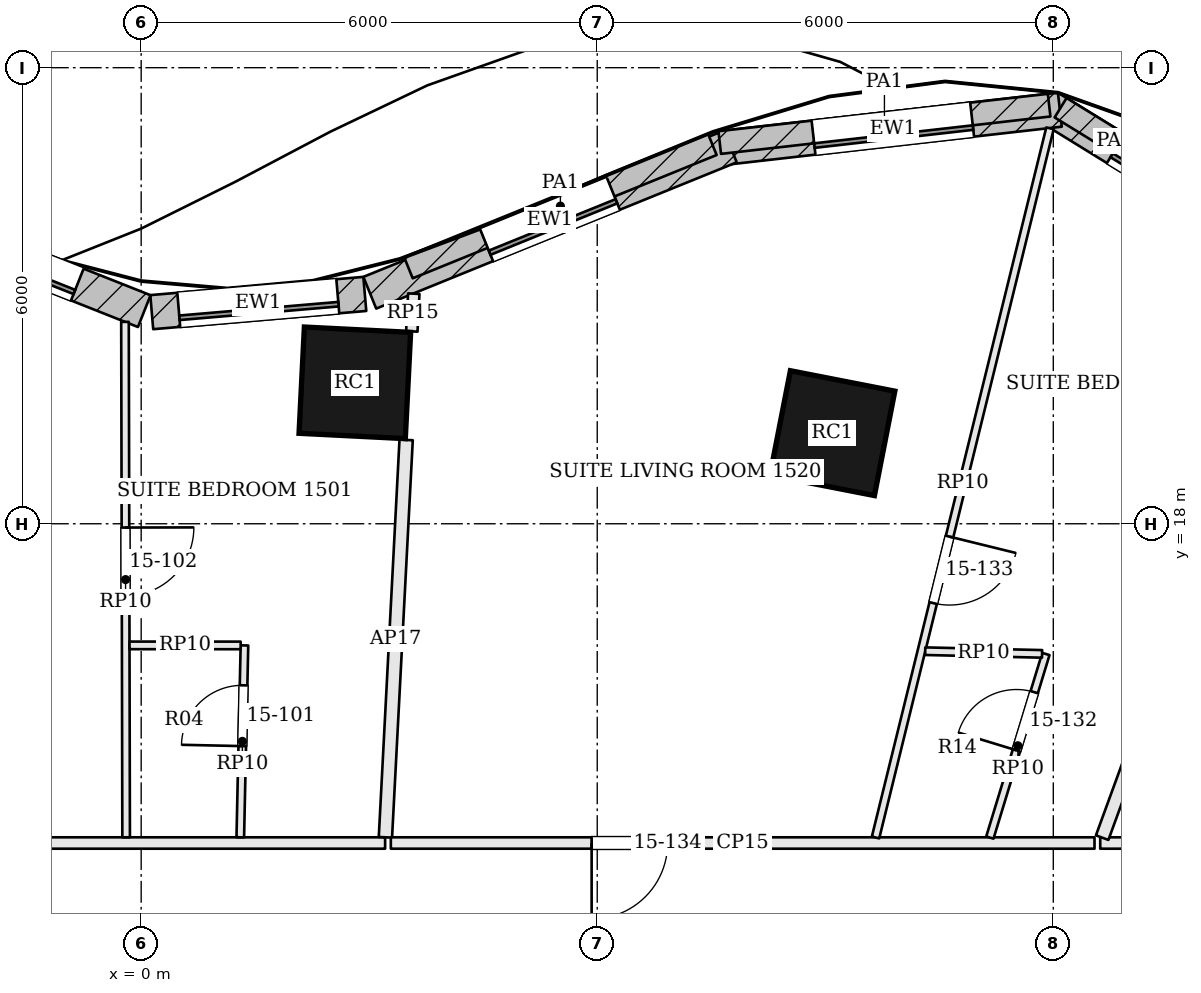
"""IFC4 building model, lengths in metres.
Left out: names, types, materials, properties, quantities, classifications, styles, units other than length and angle.
Written with IfcOpenShell. Run it as: python <this file> out.ifc"""

import sys

from ifc_helpers import new_model, si_unit, direction, frame, frame_2d, origin, origin_2d, place, context, subcontext, project, spatial, rectangle, extrude, element, fill, save


model = new_model("IFC4")
c1 = context("Model", 3, precision=1e-05, world=origin(), true_north=direction((0.0, 1.0)))
c2 = subcontext(c1, "Body", "Model", "MODEL_VIEW")
j1 = project(units=[si_unit("LENGTHUNIT", "METRE"), si_unit("PLANEANGLEUNIT", "RADIAN")], contexts=[c1])
p1 = place(None, origin())
s1 = spatial("IfcSite", under=j1, at=p1, CompositionType="ELEMENT")
p2 = place(p1, origin())
s2 = spatial("IfcBuilding", under=s1, at=p2, CompositionType="ELEMENT")
p3 = place(p2, frame((0.0, 0.0, 69.9)))
s3 = spatial("IfcBuildingStorey", under=s2, at=p3, CompositionType="ELEMENT", Elevation=69.9)
for number, where, z_axis, x_axis in (
    (1, (9.094, 19.192, 0.0), (0.0, 0.0, 1.0), (-0.981, 0.192, 0.0)),
    (2, (2.811, 19.854, 0.0), (0.0, 0.0, 1.0), (-0.999, 0.05, 0.0)),
):
    element("IfcColumn", number, at=place(p3, frame(where, z_axis=z_axis, x_axis=x_axis)), inside=s3, PredefinedType="COLUMN", context=c2, shape_type="SweptSolid", body=[
        extrude(rectangle(XDim=1.4, YDim=1.4, at=origin_2d()), origin(), (0.0, 0.0, 1.0), 3.6),
    ])
p4 = place(p3, frame((15.492, 21.293, 0.0), z_axis=(0.0, 0.0, 1.0), x_axis=(-0.851428967753, 0.524469935145, 0.0)))
e3 = element("IfcWall", 3, at=p4, inside=s3, PredefinedType="SOLIDWALL", context=c2, shape_type="SweptSolid", body=[
    extrude(rectangle(XDim=4.168, YDim=0.45, at=frame_2d((2.084, 0.0))), origin(), (0.0, 0.0, 1.0), 3.4),
])
p5 = place(p4, frame((1.034, 0.0, 0.9)))
e4 = element("IfcOpeningElement", 4, at=p5, cuts=e3, PredefinedType="OPENING", context=c2, shape_type="SweptSolid", body=[
    extrude(rectangle(XDim=2.1, YDim=2.0, at=frame_2d((1.05, 1.0))), frame((0.0, 0.235, 0.0), z_axis=(0.0, -1.0, 0.0), x_axis=(1.0, 0.0, 0.0)), (0.0, 0.0, 1.0), 0.47),
])
p6 = place(p3, frame((12.086, 23.448, 0.0), z_axis=(0.0, 0.0, 1.0), x_axis=(-0.993615664665, -0.112818043472, 0.0)))
e5 = element("IfcWall", 5, at=p6, inside=s3, PredefinedType="SOLIDWALL", context=c2, shape_type="SweptSolid", body=[
    extrude(rectangle(XDim=4.423, YDim=0.45, at=frame_2d((2.212, 0.0))), origin(), (0.0, 0.0, 1.0), 3.4),
])
p7 = place(p6, frame((1.162, 0.0, 0.9)))
e6 = element("IfcOpeningElement", 6, at=p7, cuts=e5, PredefinedType="OPENING", context=c2, shape_type="SweptSolid", body=[
    extrude(rectangle(XDim=2.1, YDim=2.0, at=frame_2d((1.05, 1.0))), frame((0.0, 0.235, 0.0), z_axis=(0.0, -1.0, 0.0), x_axis=(1.0, 0.0, 0.0)), (0.0, 0.0, 1.0), 0.47),
])
p8 = place(p3, frame((7.75, 22.964, 0.0), z_axis=(0.0, 0.0, 1.0), x_axis=(-0.926629703254, -0.375975255897, 0.0)))
e7 = element("IfcWall", 7, at=p8, inside=s3, PredefinedType="SOLIDWALL", context=c2, shape_type="SweptSolid", body=[
    extrude(rectangle(XDim=5.118, YDim=0.45, at=frame_2d((2.559, 0.0))), origin(), (0.0, 0.0, 1.0), 3.4),
])
p9 = place(p8, frame((1.659, 0.0, 0.9)))
e8 = element("IfcOpeningElement", 8, at=p9, cuts=e7, PredefinedType="OPENING", context=c2, shape_type="SweptSolid", body=[
    extrude(rectangle(XDim=1.8, YDim=2.0, at=frame_2d((0.9, 1.0))), frame((0.0, 0.235, 0.0), z_axis=(0.0, -1.0, 0.0), x_axis=(1.0, 0.0, 0.0)), (0.0, 0.0, 1.0), 0.47),
])
p10 = place(p3, frame((2.942, 21.024, 0.0), z_axis=(0.0, 0.0, 1.0), x_axis=(-0.996362034459, -0.085221454389, 0.0)))
e9 = element("IfcWall", 9, at=p10, inside=s3, PredefinedType="SOLIDWALL", context=c2, shape_type="SweptSolid", body=[
    extrude(rectangle(XDim=2.813, YDim=0.45, at=frame_2d((1.407, 0.0))), origin(), (0.0, 0.0, 1.0), 3.4),
])
p11 = place(p10, frame((0.357, 0.0, 0.9)))
e10 = element("IfcOpeningElement", 10, at=p11, cuts=e9, PredefinedType="OPENING", context=c2, shape_type="SweptSolid", body=[
    extrude(rectangle(XDim=2.1, YDim=2.0, at=frame_2d((1.05, 1.0))), frame((0.0, 0.235, 0.0), z_axis=(0.0, -1.0, 0.0), x_axis=(1.0, 0.0, 0.0)), (0.0, 0.0, 1.0), 0.47),
])
p12 = place(p3, frame((0.041, 20.798, 0.0), z_axis=(0.0, 0.0, 1.0), x_axis=(-0.929539262027, 0.368723148649, 0.0)))
e11 = element("IfcWall", 11, at=p12, inside=s3, PredefinedType="SOLIDWALL", context=c2, shape_type="SweptSolid", body=[
    extrude(rectangle(XDim=3.995, YDim=0.45, at=frame_2d((1.997, 0.0))), origin(), (0.0, 0.0, 1.0), 3.4),
])
p13 = place(p12, frame((0.947, 0.0, 0.9)))
e12 = element("IfcOpeningElement", 12, at=p13, cuts=e11, PredefinedType="OPENING", context=c2, shape_type="SweptSolid", body=[
    extrude(rectangle(XDim=2.1, YDim=2.0, at=frame_2d((1.05, 1.0))), frame((0.0, 0.235, 0.0), z_axis=(0.0, -1.0, 0.0), x_axis=(1.0, 0.0, 0.0)), (0.0, 0.0, 1.0), 0.47),
])
p14 = place(p3, frame((13.53, 22.59, 3.6), z_axis=(0.0, 0.0, 1.0), x_axis=(-0.851434206084, 0.524461431098, 0.0)))
e13 = element("IfcWall", 13, at=p14, inside=s3, PredefinedType="PARAPET", context=c2, shape_type="SweptSolid", body=[
    extrude(rectangle(XDim=1.684, YDim=0.3, at=frame_2d((0.842, 0.0))), origin(), (0.0, 0.0, 1.0), 1.1),
])
p15 = place(p3, frame((11.945, 23.507, 3.6), z_axis=(0.0, 0.0, 1.0), x_axis=(-0.993618806168, -0.11279037206, 0.0)))
e14 = element("IfcWall", 14, at=p15, inside=s3, PredefinedType="PARAPET", context=c2, shape_type="SweptSolid", body=[
    extrude(rectangle(XDim=4.362, YDim=0.3, at=frame_2d((2.181, 0.0))), origin(), (0.0, 0.0, 1.0), 1.1),
])
p16 = place(p3, frame((7.514, 22.99, 3.6), z_axis=(0.0, 0.0, 1.0), x_axis=(-0.926627413994, -0.375980897966, 0.0)))
e15 = element("IfcWall", 15, at=p16, inside=s3, PredefinedType="PARAPET", context=c2, shape_type="SweptSolid", body=[
    extrude(rectangle(XDim=4.315, YDim=0.3, at=frame_2d((2.157, 0.0))), origin(), (0.0, 0.0, 1.0), 1.1),
])
p17 = place(p3, frame((3.209, 13.8, 0.0), z_axis=(0.0, 0.0, 1.0), x_axis=(-1.0, 0.0, 0.0)))
e16 = element("IfcWall", 16, at=p17, inside=s3, PredefinedType="PARTITIONING", context=c2, shape_type="SweptSolid", body=[
    extrude(rectangle(XDim=12.728, YDim=0.15, at=frame_2d((6.364, 0.0))), origin(), (0.0, 0.0, 1.0), 2.68),
])
p18 = place(p17, frame((7.568, 0.0, 0.0)))
e17 = element("IfcOpeningElement", 17, at=p18, cuts=e16, PredefinedType="OPENING", context=c2, shape_type="SweptSolid", body=[
    extrude(rectangle(XDim=1.0, YDim=2.1, at=frame_2d((0.5, 1.05))), frame((0.0, 0.085, 0.0), z_axis=(0.0, -1.0, 0.0), x_axis=(1.0, 0.0, 0.0)), (0.0, 0.0, 1.0), 0.17),
])
p19 = place(p3, frame((3.586, 21.027, 0.0), z_axis=(0.0, 0.0, 1.0), x_axis=(-0.052094522049, -0.99864215852, 0.0)))
e18 = element("IfcWall", 18, at=p19, inside=s3, PredefinedType="PARTITIONING", context=c2, shape_type="SweptSolid", body=[
    extrude(rectangle(XDim=0.497, YDim=0.15, at=frame_2d((0.249, 0.0))), origin(), (0.0, 0.0, 1.0), 3.4),
])
p20 = place(p3, frame((3.486, 19.103, 0.0), z_axis=(0.0, 0.0, 1.0), x_axis=(-0.052091317725, -0.998642325669, 0.0)))
e19 = element("IfcWall", 19, at=p20, inside=s3, PredefinedType="PARTITIONING", context=c2, shape_type="SweptSolid", body=[
    extrude(rectangle(XDim=5.235, YDim=0.175, at=frame_2d((2.618, 0.0))), origin(), (0.0, 0.0, 1.0), 2.68),
])
p21 = place(p3, frame((14.725, 13.8, 0.0), z_axis=(0.0, 0.0, 1.0), x_axis=(-1.0, 0.0, 0.0)))
e20 = element("IfcWall", 20, at=p21, inside=s3, PredefinedType="PARTITIONING", context=c2, shape_type="SweptSolid", body=[
    extrude(rectangle(XDim=2.108, YDim=0.15, at=frame_2d((1.054, 0.0))), origin(), (0.0, 0.0, 1.0), 2.68),
])
p22 = place(p21, frame((0.45, 0.0, 0.0)))
e21 = element("IfcOpeningElement", 21, at=p22, cuts=e20, PredefinedType="OPENING", context=c2, shape_type="SweptSolid", body=[
    extrude(rectangle(XDim=1.0, YDim=2.1, at=frame_2d((0.5, 1.05))), frame((0.0, 0.085, 0.0), z_axis=(0.0, -1.0, 0.0), x_axis=(1.0, 0.0, 0.0)), (0.0, 0.0, 1.0), 0.17),
])
p23 = place(p3, frame((15.299, 21.143, 0.0), z_axis=(0.0, 0.0, 1.0), x_axis=(-0.343006226001, -0.939333129898, 0.0)))
e22 = element("IfcWall", 22, at=p23, inside=s3, PredefinedType="PARTITIONING", context=c2, shape_type="SweptSolid", body=[
    extrude(rectangle(XDim=7.742, YDim=0.175, at=frame_2d((3.871, 0.0))), origin(), (0.0, 0.0, 1.0), 2.68),
])
p24 = place(p3, frame((12.542, 13.8, 0.0), z_axis=(0.0, 0.0, 1.0), x_axis=(-1.0, 0.0, 0.0)))
e23 = element("IfcWall", 23, at=p24, inside=s3, PredefinedType="PARTITIONING", context=c2, shape_type="SweptSolid", body=[
    extrude(rectangle(XDim=9.258, YDim=0.15, at=frame_2d((4.629, 0.0))), origin(), (0.0, 0.0, 1.0), 2.68),
])
p25 = place(p24, frame((5.616, 0.0, 0.0)))
e24 = element("IfcOpeningElement", 24, at=p25, cuts=e23, PredefinedType="OPENING", context=c2, shape_type="SweptSolid", body=[
    extrude(rectangle(XDim=1.0, YDim=2.1, at=frame_2d((0.5, 1.05))), frame((0.0, 0.085, 0.0), z_axis=(0.0, -1.0, 0.0), x_axis=(1.0, 0.0, 0.0)), (0.0, 0.0, 1.0), 0.17),
])
p26 = place(p3, frame((-0.213, 20.656, 0.0), z_axis=(0.0, 0.0, 1.0), x_axis=(0.002196214325, -0.999997588318, 0.0)))
e25 = element("IfcWall", 25, at=p26, inside=s3, PredefinedType="PARTITIONING", context=c2, shape_type="SweptSolid", body=[
    extrude(rectangle(XDim=6.781, YDim=0.1, at=frame_2d((3.391, 0.0))), origin(), (0.0, 0.0, 1.0), 2.898),
])
p27 = place(p26, frame((2.706, 0.0, 0.0)))
e26 = element("IfcOpeningElement", 26, at=p27, cuts=e25, PredefinedType="OPENING", context=c2, shape_type="SweptSolid", body=[
    extrude(rectangle(XDim=0.9, YDim=2.4, at=frame_2d((0.45, 1.2))), frame((0.0, 0.06, 0.0), z_axis=(0.0, -1.0, 0.0), x_axis=(1.0, 0.0, 0.0)), (0.0, 0.0, 1.0), 0.12),
])
p28 = place(p3, frame((1.304, 13.875, 0.0), z_axis=(0.0, 0.0, 1.0), x_axis=(0.02165836135, 0.99976543018, 0.0)))
e27 = element("IfcWall", 27, at=p28, inside=s3, PredefinedType="PARTITIONING", context=c2, shape_type="SweptSolid", body=[
    extrude(rectangle(XDim=2.525, YDim=0.1, at=frame_2d((1.262, 0.0))), origin(), (0.0, 0.0, 1.0), 2.898),
])
p29 = place(p28, frame((1.2, 0.0, 0.0)))
e28 = element("IfcOpeningElement", 28, at=p29, cuts=e27, PredefinedType="OPENING", context=c2, shape_type="SweptSolid", body=[
    extrude(rectangle(XDim=0.8, YDim=2.1, at=frame_2d((0.4, 1.05))), frame((0.0, 0.06, 0.0), z_axis=(0.0, -1.0, 0.0), x_axis=(1.0, 0.0, 0.0)), (0.0, 0.0, 1.0), 0.12),
])
p30 = place(p3, frame((1.309, 16.399, 0.0), z_axis=(0.0, 0.0, 1.0), x_axis=(-0.99999994424, 0.000333945548, 0.0)))
e29 = element("IfcWall", 29, at=p30, inside=s3, PredefinedType="PARTITIONING", context=c2, shape_type="SweptSolid", body=[
    extrude(rectangle(XDim=1.462, YDim=0.1, at=frame_2d((0.731, 0.0))), origin(), (0.0, 0.0, 1.0), 2.898),
])
p31 = place(p3, frame((11.956, 23.202, 0.0), z_axis=(0.0, 0.0, 1.0), x_axis=(-0.238844688636, -0.971057781345, 0.0)))
e30 = element("IfcWall", 30, at=p31, inside=s3, PredefinedType="PARTITIONING", context=c2, shape_type="SweptSolid", body=[
    extrude(rectangle(XDim=9.607, YDim=0.1, at=frame_2d((4.804, 0.0))), origin(), (0.0, 0.0, 1.0), 2.898),
])
p32 = place(p31, frame((5.532, 0.0, 0.0)))
e31 = element("IfcOpeningElement", 31, at=p32, cuts=e30, PredefinedType="OPENING", context=c2, shape_type="SweptSolid", body=[
    extrude(rectangle(XDim=0.9, YDim=2.4, at=frame_2d((0.45, 1.2))), frame((0.0, 0.06, 0.0), z_axis=(0.0, -1.0, 0.0), x_axis=(1.0, 0.0, 0.0)), (0.0, 0.0, 1.0), 0.12),
])
p33 = place(p3, frame((11.166, 13.872, 0.0), z_axis=(0.0, 0.0, 1.0), x_axis=(0.291788653179, 0.95648281839, 0.0)))
e32 = element("IfcWall", 32, at=p33, inside=s3, PredefinedType="PARTITIONING", context=c2, shape_type="SweptSolid", body=[
    extrude(rectangle(XDim=2.525, YDim=0.1, at=frame_2d((1.263, 0.0))), origin(), (0.0, 0.0, 1.0), 2.898),
])
p34 = place(p33, frame((1.2, 0.0, 0.0)))
e33 = element("IfcOpeningElement", 33, at=p34, cuts=e32, PredefinedType="OPENING", context=c2, shape_type="SweptSolid", body=[
    extrude(rectangle(XDim=0.8, YDim=2.1, at=frame_2d((0.4, 1.05))), frame((0.0, 0.06, 0.0), z_axis=(0.0, -1.0, 0.0), x_axis=(1.0, 0.0, 0.0)), (0.0, 0.0, 1.0), 0.12),
])
p35 = place(p3, frame((11.852, 16.288, 0.0), z_axis=(0.0, 0.0, 1.0), x_axis=(-0.999735071864, 0.023017082474, 0.0)))
e34 = element("IfcWall", 34, at=p35, inside=s3, PredefinedType="PARTITIONING", context=c2, shape_type="SweptSolid", body=[
    extrude(rectangle(XDim=1.538, YDim=0.1, at=frame_2d((0.769, 0.0))), origin(), (0.0, 0.0, 1.0), 2.898),
])
p36 = place(p5, origin())
e35 = element("IfcWindow", 35, at=p36, inside=s3, PartitioningType="SINGLE_PANEL", PredefinedType="WINDOW", context=c2, shape_type="SweptSolid", body=[
    extrude(rectangle(XDim=2.1, YDim=2.0, at=frame_2d((1.05, 1.0))), frame((0.0, 0.135, 0.0), z_axis=(0.0, -1.0, 0.0), x_axis=(1.0, 0.0, 0.0)), (0.0, 0.0, 1.0), 0.06),
])
fill(e4, e35)
p37 = place(p7, origin())
e36 = element("IfcWindow", 36, at=p37, inside=s3, PartitioningType="SINGLE_PANEL", PredefinedType="WINDOW", context=c2, shape_type="SweptSolid", body=[
    extrude(rectangle(XDim=2.1, YDim=2.0, at=frame_2d((1.05, 1.0))), frame((0.0, 0.135, 0.0), z_axis=(0.0, -1.0, 0.0), x_axis=(1.0, 0.0, 0.0)), (0.0, 0.0, 1.0), 0.06),
])
fill(e6, e36)
p38 = place(p9, origin())
e37 = element("IfcWindow", 37, at=p38, inside=s3, PartitioningType="SINGLE_PANEL", PredefinedType="WINDOW", context=c2, shape_type="SweptSolid", body=[
    extrude(rectangle(XDim=1.8, YDim=2.0, at=frame_2d((0.9, 1.0))), frame((0.0, 0.135, 0.0), z_axis=(0.0, -1.0, 0.0), x_axis=(1.0, 0.0, 0.0)), (0.0, 0.0, 1.0), 0.06),
])
fill(e8, e37)
p39 = place(p11, origin())
e38 = element("IfcWindow", 38, at=p39, inside=s3, PartitioningType="SINGLE_PANEL", PredefinedType="WINDOW", context=c2, shape_type="SweptSolid", body=[
    extrude(rectangle(XDim=2.1, YDim=2.0, at=frame_2d((1.05, 1.0))), frame((0.0, 0.135, 0.0), z_axis=(0.0, -1.0, 0.0), x_axis=(1.0, 0.0, 0.0)), (0.0, 0.0, 1.0), 0.06),
])
fill(e10, e38)
p40 = place(p13, origin())
e39 = element("IfcWindow", 39, at=p40, inside=s3, PartitioningType="SINGLE_PANEL", PredefinedType="WINDOW", context=c2, shape_type="SweptSolid", body=[
    extrude(rectangle(XDim=2.1, YDim=2.0, at=frame_2d((1.05, 1.0))), frame((0.0, 0.135, 0.0), z_axis=(0.0, -1.0, 0.0), x_axis=(1.0, 0.0, 0.0)), (0.0, 0.0, 1.0), 0.06),
])
fill(e12, e39)
p41 = place(p29, origin())
e40 = element("IfcDoor", 40, at=p41, inside=s3, OperationType="SINGLE_SWING_LEFT", PredefinedType="DOOR", context=c2, shape_type="SweptSolid", body=[
    extrude(rectangle(XDim=0.8, YDim=2.1, at=frame_2d((0.4, 1.05))), frame((0.0, 0.025, 0.0), z_axis=(0.0, -1.0, 0.0), x_axis=(1.0, 0.0, 0.0)), (0.0, 0.0, 1.0), 0.05),
])
fill(e28, e40)
p42 = place(p27, origin())
e41 = element("IfcDoor", 41, at=p42, inside=s3, OperationType="SINGLE_SWING_LEFT", PredefinedType="DOOR", context=c2, shape_type="SweptSolid", body=[
    extrude(rectangle(XDim=0.9, YDim=2.4, at=frame_2d((0.45, 1.2))), frame((0.0, 0.025, 0.0), z_axis=(0.0, -1.0, 0.0), x_axis=(1.0, 0.0, 0.0)), (0.0, 0.0, 1.0), 0.05),
])
fill(e26, e41)
p43 = place(p34, origin())
e42 = element("IfcDoor", 42, at=p43, inside=s3, OperationType="SINGLE_SWING_LEFT", PredefinedType="DOOR", context=c2, shape_type="SweptSolid", body=[
    extrude(rectangle(XDim=0.8, YDim=2.1, at=frame_2d((0.4, 1.05))), frame((0.0, 0.025, 0.0), z_axis=(0.0, -1.0, 0.0), x_axis=(1.0, 0.0, 0.0)), (0.0, 0.0, 1.0), 0.05),
])
fill(e33, e42)
p44 = place(p32, origin())
e43 = element("IfcDoor", 43, at=p44, inside=s3, OperationType="SINGLE_SWING_LEFT", PredefinedType="DOOR", context=c2, shape_type="SweptSolid", body=[
    extrude(rectangle(XDim=0.9, YDim=2.4, at=frame_2d((0.45, 1.2))), frame((0.0, 0.025, 0.0), z_axis=(0.0, -1.0, 0.0), x_axis=(1.0, 0.0, 0.0)), (0.0, 0.0, 1.0), 0.05),
])
fill(e31, e43)
p45 = place(p25, origin())
e44 = element("IfcDoor", 44, at=p45, inside=s3, OperationType="SINGLE_SWING_RIGHT", PredefinedType="DOOR", context=c2, shape_type="SweptSolid", body=[
    extrude(rectangle(XDim=1.0, YDim=2.1, at=frame_2d((0.5, 1.05))), frame((0.0, 0.025, 0.0), z_axis=(0.0, -1.0, 0.0), x_axis=(1.0, 0.0, 0.0)), (0.0, 0.0, 1.0), 0.05),
])
fill(e24, e44)
save(model, sys.argv[1])
